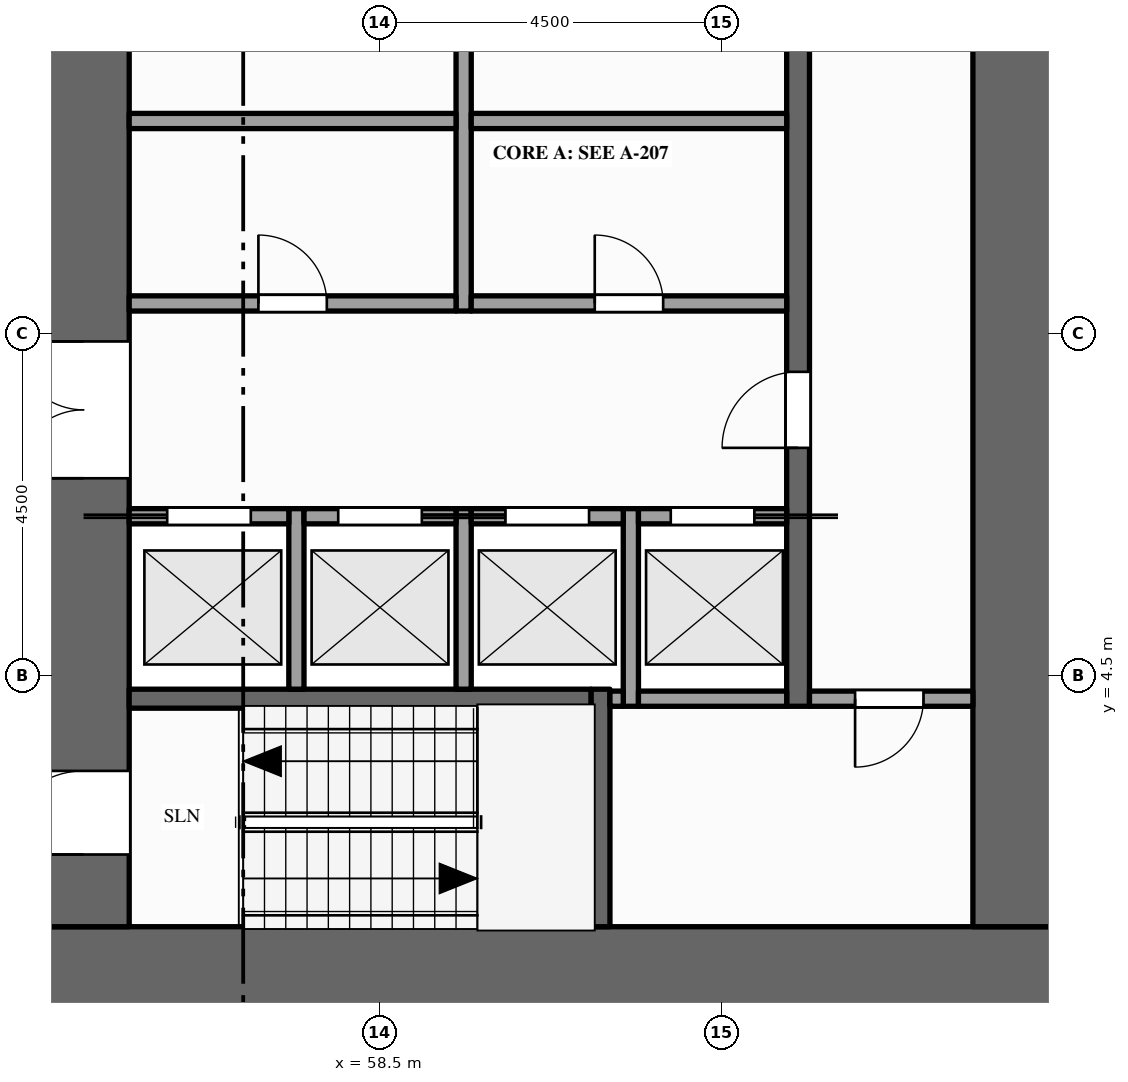
"""IFC4 building model, lengths in metres.
Left out: names, types, materials, properties, quantities, classifications, styles, units other than length and angle.
Written with IfcOpenShell. Run it as: python <this file> out.ifc"""

import sys

from ifc_helpers import new_model, si_unit, direction, frame, frame_2d, origin, place, context, subcontext, project, spatial, rectangle, extrude, element, fill, save


model = new_model("IFC4")
c1 = context("Model", 3, precision=1e-05, world=origin(), true_north=direction((0.0, 1.0)))
c2 = subcontext(c1, "Body", "Model", "MODEL_VIEW")
j1 = project(units=[si_unit("LENGTHUNIT", "METRE"), si_unit("PLANEANGLEUNIT", "RADIAN")], contexts=[c1])
p1 = place(None, origin())
s1 = spatial("IfcSite", under=j1, at=p1, CompositionType="ELEMENT")
p2 = place(p1, origin())
s2 = spatial("IfcBuilding", under=s1, at=p2, CompositionType="ELEMENT")
p3 = place(p2, frame((0.0, 0.0, 33.0)))
s3 = spatial("IfcBuildingStorey", under=s2, at=p3, CompositionType="ELEMENT", Elevation=33.0)
p4 = place(p3, frame((67.5, 0.6, -0.15), z_axis=(0.0, 0.0, 1.0), x_axis=(-1.0, 0.0, 0.0)))
e1 = element("IfcWall", 1, at=p4, inside=s3, PredefinedType="SHEAR", context=c2, shape_type="SweptSolid", body=[
    extrude(rectangle(XDim=13.5, YDim=1.2, at=frame_2d((6.75, 0.0))), origin(), (0.0, 0.0, 1.0), 4.0),
])
p5 = place(p3, frame((54.6, 1.2, -0.15), z_axis=(0.0, 0.0, 1.0), x_axis=(0.0, 1.0, 0.0)))
e2 = element("IfcWall", 2, at=p5, inside=s3, PredefinedType="SHEAR", context=c2, shape_type="SweptSolid", body=[
    extrude(rectangle(XDim=20.1, YDim=1.2, at=frame_2d((10.05, 0.0))), origin(), (0.0, 0.0, 1.0), 4.0),
])
p6 = place(p5, frame((5.9, 0.0, 0.15)))
e3 = element("IfcOpeningElement", 3, at=p6, cuts=e2, PredefinedType="OPENING", context=c2, shape_type="SweptSolid", body=[
    extrude(rectangle(XDim=1.8, YDim=2.1, at=frame_2d((0.9, 1.05))), frame((0.0, 0.61, 0.0), z_axis=(0.0, -1.0, 0.0), x_axis=(1.0, 0.0, 0.0)), (0.0, 0.0, 1.0), 1.22),
])
p7 = place(p5, frame((11.95, 0.0, 0.15)))
e4 = element("IfcOpeningElement", 4, at=p7, cuts=e2, PredefinedType="OPENING", context=c2, shape_type="SweptSolid", body=[
    extrude(rectangle(XDim=1.1, YDim=2.1, at=frame_2d((0.55, 1.05))), frame((0.0, 0.61, 0.0), z_axis=(0.0, -1.0, 0.0), x_axis=(1.0, 0.0, 0.0)), (0.0, 0.0, 1.0), 1.22),
])
p8 = place(p5, frame((0.95, 0.0, 0.15)))
e5 = element("IfcOpeningElement", 5, at=p8, cuts=e2, PredefinedType="OPENING", context=c2, shape_type="SweptSolid", body=[
    extrude(rectangle(XDim=1.1, YDim=2.1, at=frame_2d((0.55, 1.05))), frame((0.0, 0.61, 0.0), z_axis=(0.0, -1.0, 0.0), x_axis=(1.0, 0.0, 0.0)), (0.0, 0.0, 1.0), 1.22),
])
p9 = place(p5, frame((18.15, 0.0, 0.15)))
e6 = element("IfcOpeningElement", 6, at=p9, cuts=e2, PredefinedType="OPENING", context=c2, shape_type="SweptSolid", body=[
    extrude(rectangle(XDim=1.1, YDim=2.1, at=frame_2d((0.55, 1.05))), frame((0.0, 0.61, 0.0), z_axis=(0.0, -1.0, 0.0), x_axis=(1.0, 0.0, 0.0)), (0.0, 0.0, 1.0), 1.22),
])
p10 = place(p3, frame((66.9, 1.2, -0.15), z_axis=(0.0, 0.0, 1.0), x_axis=(0.0, 1.0, 0.0)))
e7 = element("IfcWall", 7, at=p10, inside=s3, PredefinedType="SHEAR", context=c2, shape_type="SweptSolid", body=[
    extrude(rectangle(XDim=20.1, YDim=1.2, at=frame_2d((10.05, 0.0))), origin(), (0.0, 0.0, 1.0), 4.0),
])
for number, where, z_axis, x_axis in (
    (8, (57.4, 4.325, 0.0), (0.0, 0.0, 1.0), (0.0, 1.0, 0.0)),
    (9, (59.6, 4.325, 0.0), (0.0, 0.0, 1.0), (0.0, 1.0, 0.0)),
):
    element("IfcWall", number, at=place(p3, frame(where, z_axis=z_axis, x_axis=x_axis)), inside=s3, PredefinedType="SOLIDWALL", context=c2, shape_type="SweptSolid", body=[
        extrude(rectangle(XDim=2.375, YDim=0.2, at=frame_2d((1.188, 0.0))), origin(), (0.0, 0.0, 1.0), 3.85),
    ])
p11 = place(p3, frame((59.6, 9.3, 0.0), z_axis=(0.0, 0.0, 1.0), x_axis=(0.0, 1.0, 0.0)))
e10 = element("IfcWall", 10, at=p11, inside=s3, PredefinedType="PARTITIONING", context=c2, shape_type="SweptSolid", body=[
    extrude(rectangle(XDim=6.2, YDim=0.2, at=frame_2d((3.1, 0.0))), origin(), (0.0, 0.0, 1.0), 3.85),
])
p12 = place(p11, frame((3.9, 0.0, 0.0)))
e11 = element("IfcOpeningElement", 11, at=p12, cuts=e10, PredefinedType="OPENING", context=c2, shape_type="SweptSolid", body=[
    extrude(rectangle(XDim=1.0, YDim=2.1, at=frame_2d((0.5, 1.05))), frame((0.0, 0.11, 0.0), z_axis=(0.0, -1.0, 0.0), x_axis=(1.0, 0.0, 0.0)), (0.0, 0.0, 1.0), 0.22),
])
p13 = place(p3, frame((61.4, 1.2, 0.0), z_axis=(0.0, 0.0, 1.0), x_axis=(0.0, 1.0, 0.0)))
e12 = element("IfcWall", 12, at=p13, inside=s3, PredefinedType="SHEAR", context=c2, shape_type="SweptSolid", body=[
    extrude(rectangle(XDim=3.125, YDim=0.25, at=frame_2d((1.562, 0.0))), origin(), (0.0, 0.0, 1.0), 3.85),
])
p14 = place(p3, frame((61.8, 4.1, 0.0), z_axis=(0.0, 0.0, 1.0), x_axis=(0.0, 1.0, 0.0)))
e13 = element("IfcWall", 13, at=p14, inside=s3, PredefinedType="SOLIDWALL", context=c2, shape_type="SweptSolid", body=[
    extrude(rectangle(XDim=2.6, YDim=0.2, at=frame_2d((1.3, 0.0))), origin(), (0.0, 0.0, 1.0), 3.85),
])
p15 = place(p3, frame((64.0, 4.1, 0.0), z_axis=(0.0, 0.0, 1.0), x_axis=(0.0, 1.0, 0.0)))
e14 = element("IfcWall", 14, at=p15, inside=s3, PredefinedType="SHEAR", context=c2, shape_type="SweptSolid", body=[
    extrude(rectangle(XDim=14.5, YDim=0.3, at=frame_2d((7.25, 0.0))), origin(), (0.0, 0.0, 1.0), 3.85),
])
p16 = place(p15, frame((3.4, 0.0, 0.0)))
e15 = element("IfcOpeningElement", 15, at=p16, cuts=e14, PredefinedType="OPENING", context=c2, shape_type="SweptSolid", body=[
    extrude(rectangle(XDim=1.0, YDim=2.1, at=frame_2d((0.5, 1.05))), frame((0.0, 0.16, 0.0), z_axis=(0.0, -1.0, 0.0), x_axis=(1.0, 0.0, 0.0)), (0.0, 0.0, 1.0), 0.32),
])
p17 = place(p15, frame((9.1, 0.0, 0.0)))
e16 = element("IfcOpeningElement", 16, at=p17, cuts=e14, PredefinedType="OPENING", context=c2, shape_type="SweptSolid", body=[
    extrude(rectangle(XDim=1.0, YDim=2.1, at=frame_2d((0.5, 1.05))), frame((0.0, 0.16, 0.0), z_axis=(0.0, -1.0, 0.0), x_axis=(1.0, 0.0, 0.0)), (0.0, 0.0, 1.0), 0.32),
])
p18 = place(p3, frame((55.2, 4.2, 0.0), z_axis=(0.0, 0.0, 1.0), x_axis=(1.0, 0.0, 0.0)))
e17 = element("IfcWall", 17, at=p18, inside=s3, PredefinedType="SHEAR", context=c2, shape_type="SweptSolid", body=[
    extrude(rectangle(XDim=6.075, YDim=0.25, at=frame_2d((3.038, 0.0))), origin(), (0.0, 0.0, 1.0), 3.85),
])
p19 = place(p3, frame((61.525, 4.2, 0.0), z_axis=(0.0, 0.0, 1.0), x_axis=(1.0, 0.0, 0.0)))
e18 = element("IfcWall", 18, at=p19, inside=s3, PredefinedType="SOLIDWALL", context=c2, shape_type="SweptSolid", body=[
    extrude(rectangle(XDim=0.175, YDim=0.2, at=frame_2d((0.087, 0.0))), origin(), (0.0, 0.0, 1.0), 3.85),
])
p20 = place(p3, frame((61.9, 4.2, 0.0), z_axis=(0.0, 0.0, 1.0), x_axis=(1.0, 0.0, 0.0)))
e19 = element("IfcWall", 19, at=p20, inside=s3, PredefinedType="SOLIDWALL", context=c2, shape_type="SweptSolid", body=[
    extrude(rectangle(XDim=1.95, YDim=0.2, at=frame_2d((0.975, 0.0))), origin(), (0.0, 0.0, 1.0), 3.85),
])
p21 = place(p3, frame((64.15, 4.2, 0.0), z_axis=(0.0, 0.0, 1.0), x_axis=(1.0, 0.0, 0.0)))
e20 = element("IfcWall", 20, at=p21, inside=s3, PredefinedType="PARTITIONING", context=c2, shape_type="SweptSolid", body=[
    extrude(rectangle(XDim=2.15, YDim=0.2, at=frame_2d((1.075, 0.0))), origin(), (0.0, 0.0, 1.0), 3.85),
])
p22 = place(p21, frame((0.6, 0.0, 0.0)))
e21 = element("IfcOpeningElement", 21, at=p22, cuts=e20, PredefinedType="OPENING", context=c2, shape_type="SweptSolid", body=[
    extrude(rectangle(XDim=0.9, YDim=2.1, at=frame_2d((0.45, 1.05))), frame((0.0, 0.11, 0.0), z_axis=(0.0, -1.0, 0.0), x_axis=(1.0, 0.0, 0.0)), (0.0, 0.0, 1.0), 0.22),
])
p23 = place(p3, frame((55.2, 6.6, 0.0), z_axis=(0.0, 0.0, 1.0), x_axis=(1.0, 0.0, 0.0)))
e22 = element("IfcWall", 22, at=p23, inside=s3, PredefinedType="SOLIDWALL", context=c2, shape_type="SweptSolid", body=[
    extrude(rectangle(XDim=2.1, YDim=0.2, at=frame_2d((1.05, 0.0))), origin(), (0.0, 0.0, 1.0), 3.85),
])
p24 = place(p23, frame((0.5, 0.0, 0.012)))
e23 = element("IfcOpeningElement", 23, at=p24, cuts=e22, PredefinedType="OPENING", context=c2, shape_type="SweptSolid", body=[
    extrude(rectangle(XDim=1.1, YDim=2.1, at=frame_2d((0.55, 1.05))), frame((0.0, 0.11, 0.0), z_axis=(0.0, -1.0, 0.0), x_axis=(1.0, 0.0, 0.0)), (0.0, 0.0, 1.0), 0.22),
])
p25 = place(p3, frame((57.5, 6.6, 0.0), z_axis=(0.0, 0.0, 1.0), x_axis=(1.0, 0.0, 0.0)))
e24 = element("IfcWall", 24, at=p25, inside=s3, PredefinedType="SOLIDWALL", context=c2, shape_type="SweptSolid", body=[
    extrude(rectangle(XDim=2.0, YDim=0.2, at=frame_2d((1.0, 0.0))), origin(), (0.0, 0.0, 1.0), 3.85),
])
p26 = place(p25, frame((0.45, 0.0, 0.012)))
e25 = element("IfcOpeningElement", 25, at=p26, cuts=e24, PredefinedType="OPENING", context=c2, shape_type="SweptSolid", body=[
    extrude(rectangle(XDim=1.1, YDim=2.1, at=frame_2d((0.55, 1.05))), frame((0.0, 0.11, 0.0), z_axis=(0.0, -1.0, 0.0), x_axis=(1.0, 0.0, 0.0)), (0.0, 0.0, 1.0), 0.22),
])
p27 = place(p3, frame((59.7, 6.6, 0.0), z_axis=(0.0, 0.0, 1.0), x_axis=(1.0, 0.0, 0.0)))
e26 = element("IfcWall", 26, at=p27, inside=s3, PredefinedType="SOLIDWALL", context=c2, shape_type="SweptSolid", body=[
    extrude(rectangle(XDim=2.0, YDim=0.2, at=frame_2d((1.0, 0.0))), origin(), (0.0, 0.0, 1.0), 3.85),
])
p28 = place(p27, frame((0.45, 0.0, 0.012)))
e27 = element("IfcOpeningElement", 27, at=p28, cuts=e26, PredefinedType="OPENING", context=c2, shape_type="SweptSolid", body=[
    extrude(rectangle(XDim=1.1, YDim=2.1, at=frame_2d((0.55, 1.05))), frame((0.0, 0.11, 0.0), z_axis=(0.0, -1.0, 0.0), x_axis=(1.0, 0.0, 0.0)), (0.0, 0.0, 1.0), 0.22),
])
p29 = place(p3, frame((61.9, 6.6, 0.0), z_axis=(0.0, 0.0, 1.0), x_axis=(1.0, 0.0, 0.0)))
e28 = element("IfcWall", 28, at=p29, inside=s3, PredefinedType="SOLIDWALL", context=c2, shape_type="SweptSolid", body=[
    extrude(rectangle(XDim=1.95, YDim=0.2, at=frame_2d((0.975, 0.0))), origin(), (0.0, 0.0, 1.0), 3.85),
])
p30 = place(p29, frame((0.425, 0.0, 0.012)))
e29 = element("IfcOpeningElement", 29, at=p30, cuts=e28, PredefinedType="OPENING", context=c2, shape_type="SweptSolid", body=[
    extrude(rectangle(XDim=1.1, YDim=2.1, at=frame_2d((0.55, 1.05))), frame((0.0, 0.11, 0.0), z_axis=(0.0, -1.0, 0.0), x_axis=(1.0, 0.0, 0.0)), (0.0, 0.0, 1.0), 0.22),
])
p31 = place(p3, frame((55.2, 9.4, 0.0), z_axis=(0.0, 0.0, 1.0), x_axis=(1.0, 0.0, 0.0)))
e30 = element("IfcWall", 30, at=p31, inside=s3, PredefinedType="PARTITIONING", context=c2, shape_type="SweptSolid", body=[
    extrude(rectangle(XDim=4.3, YDim=0.2, at=frame_2d((2.15, 0.0))), origin(), (0.0, 0.0, 1.0), 3.85),
])
p32 = place(p31, frame((1.7, 0.0, 0.0)))
e31 = element("IfcOpeningElement", 31, at=p32, cuts=e30, PredefinedType="OPENING", context=c2, shape_type="SweptSolid", body=[
    extrude(rectangle(XDim=0.9, YDim=2.1, at=frame_2d((0.45, 1.05))), frame((0.0, 0.11, 0.0), z_axis=(0.0, -1.0, 0.0), x_axis=(1.0, 0.0, 0.0)), (0.0, 0.0, 1.0), 0.22),
])
p33 = place(p3, frame((59.7, 9.4, 0.0), z_axis=(0.0, 0.0, 1.0), x_axis=(1.0, 0.0, 0.0)))
e32 = element("IfcWall", 32, at=p33, inside=s3, PredefinedType="PARTITIONING", context=c2, shape_type="SweptSolid", body=[
    extrude(rectangle(XDim=4.15, YDim=0.2, at=frame_2d((2.075, 0.0))), origin(), (0.0, 0.0, 1.0), 3.85),
])
p34 = place(p33, frame((1.625, 0.0, 0.0)))
e33 = element("IfcOpeningElement", 33, at=p34, cuts=e32, PredefinedType="OPENING", context=c2, shape_type="SweptSolid", body=[
    extrude(rectangle(XDim=0.9, YDim=2.1, at=frame_2d((0.45, 1.05))), frame((0.0, 0.11, 0.0), z_axis=(0.0, -1.0, 0.0), x_axis=(1.0, 0.0, 0.0)), (0.0, 0.0, 1.0), 0.22),
])
p35 = place(p3, frame((55.2, 11.8, 0.0), z_axis=(0.0, 0.0, 1.0), x_axis=(1.0, 0.0, 0.0)))
e34 = element("IfcWall", 34, at=p35, inside=s3, PredefinedType="PARTITIONING", context=c2, shape_type="SweptSolid", body=[
    extrude(rectangle(XDim=4.3, YDim=0.2, at=frame_2d((2.15, 0.0))), origin(), (0.0, 0.0, 1.0), 3.85),
])
p36 = place(p3, frame((59.7, 11.8, 0.0), z_axis=(0.0, 0.0, 1.0), x_axis=(1.0, 0.0, 0.0)))
e35 = element("IfcWall", 35, at=p36, inside=s3, PredefinedType="PARTITIONING", context=c2, shape_type="SweptSolid", body=[
    extrude(rectangle(XDim=4.15, YDim=0.2, at=frame_2d((2.075, 0.0))), origin(), (0.0, 0.0, 1.0), 3.85),
])
p37 = place(p24, origin())
e36 = element("IfcDoor", 36, at=p37, inside=s3, OperationType="SLIDING_TO_LEFT", PredefinedType="DOOR", context=c2, shape_type="SweptSolid", body=[
    extrude(rectangle(XDim=1.1, YDim=2.1, at=frame_2d((0.55, 1.05))), frame((0.0, 0.025, 0.0), z_axis=(0.0, -1.0, 0.0), x_axis=(1.0, 0.0, 0.0)), (0.0, 0.0, 1.0), 0.05),
])
fill(e23, e36)
p38 = place(p26, origin())
e37 = element("IfcDoor", 37, at=p38, inside=s3, OperationType="SLIDING_TO_RIGHT", PredefinedType="DOOR", context=c2, shape_type="SweptSolid", body=[
    extrude(rectangle(XDim=1.1, YDim=2.1, at=frame_2d((0.55, 1.05))), frame((0.0, 0.025, 0.0), z_axis=(0.0, -1.0, 0.0), x_axis=(1.0, 0.0, 0.0)), (0.0, 0.0, 1.0), 0.05),
])
fill(e25, e37)
p39 = place(p28, origin())
e38 = element("IfcDoor", 38, at=p39, inside=s3, OperationType="SLIDING_TO_LEFT", PredefinedType="DOOR", context=c2, shape_type="SweptSolid", body=[
    extrude(rectangle(XDim=1.1, YDim=2.1, at=frame_2d((0.55, 1.05))), frame((0.0, 0.025, 0.0), z_axis=(0.0, -1.0, 0.0), x_axis=(1.0, 0.0, 0.0)), (0.0, 0.0, 1.0), 0.05),
])
fill(e27, e38)
p40 = place(p30, origin())
e39 = element("IfcDoor", 39, at=p40, inside=s3, OperationType="SLIDING_TO_RIGHT", PredefinedType="DOOR", context=c2, shape_type="SweptSolid", body=[
    extrude(rectangle(XDim=1.1, YDim=2.1, at=frame_2d((0.55, 1.05))), frame((0.0, 0.025, 0.0), z_axis=(0.0, -1.0, 0.0), x_axis=(1.0, 0.0, 0.0)), (0.0, 0.0, 1.0), 0.05),
])
fill(e29, e39)
p41 = place(p6, origin())
e40 = element("IfcDoor", 40, at=p41, inside=s3, OperationType="DOUBLE_DOOR_SINGLE_SWING", PredefinedType="DOOR", context=c2, shape_type="SweptSolid", body=[
    extrude(rectangle(XDim=1.8, YDim=2.1, at=frame_2d((0.9, 1.05))), frame((0.0, 0.025, 0.0), z_axis=(0.0, -1.0, 0.0), x_axis=(1.0, 0.0, 0.0)), (0.0, 0.0, 1.0), 0.05),
])
fill(e3, e40)
p42 = place(p16, origin())
e41 = element("IfcDoor", 41, at=p42, inside=s3, OperationType="SINGLE_SWING_LEFT", PredefinedType="DOOR", context=c2, shape_type="SweptSolid", body=[
    extrude(rectangle(XDim=1.0, YDim=2.1, at=frame_2d((0.5, 1.05))), frame((0.0, 0.025, 0.0), z_axis=(0.0, -1.0, 0.0), x_axis=(1.0, 0.0, 0.0)), (0.0, 0.0, 1.0), 0.05),
])
fill(e15, e41)
p43 = place(p8, origin())
e42 = element("IfcDoor", 42, at=p43, inside=s3, OperationType="SINGLE_SWING_LEFT", PredefinedType="DOOR", context=c2, shape_type="SweptSolid", body=[
    extrude(rectangle(XDim=1.1, YDim=2.1, at=frame_2d((0.55, 1.05))), frame((0.0, 0.025, 0.0), z_axis=(0.0, -1.0, 0.0), x_axis=(1.0, 0.0, 0.0)), (0.0, 0.0, 1.0), 0.05),
])
fill(e5, e42)
p44 = place(p22, origin())
e43 = element("IfcDoor", 43, at=p44, inside=s3, OperationType="SINGLE_SWING_LEFT", PredefinedType="DOOR", context=c2, shape_type="SweptSolid", body=[
    extrude(rectangle(XDim=0.9, YDim=2.1, at=frame_2d((0.45, 1.05))), frame((0.0, 0.025, 0.0), z_axis=(0.0, -1.0, 0.0), x_axis=(1.0, 0.0, 0.0)), (0.0, 0.0, 1.0), 0.05),
])
fill(e21, e43)
p45 = place(p32, origin())
e44 = element("IfcDoor", 44, at=p45, inside=s3, OperationType="SINGLE_SWING_LEFT", PredefinedType="DOOR", context=c2, shape_type="SweptSolid", body=[
    extrude(rectangle(XDim=0.9, YDim=2.1, at=frame_2d((0.45, 1.05))), frame((0.0, 0.025, 0.0), z_axis=(0.0, -1.0, 0.0), x_axis=(1.0, 0.0, 0.0)), (0.0, 0.0, 1.0), 0.05),
])
fill(e31, e44)
p46 = place(p34, origin())
e45 = element("IfcDoor", 45, at=p46, inside=s3, OperationType="SINGLE_SWING_LEFT", PredefinedType="DOOR", context=c2, shape_type="SweptSolid", body=[
    extrude(rectangle(XDim=0.9, YDim=2.1, at=frame_2d((0.45, 1.05))), frame((0.0, 0.025, 0.0), z_axis=(0.0, -1.0, 0.0), x_axis=(1.0, 0.0, 0.0)), (0.0, 0.0, 1.0), 0.05),
])
fill(e33, e45)
save(model, sys.argv[1])
